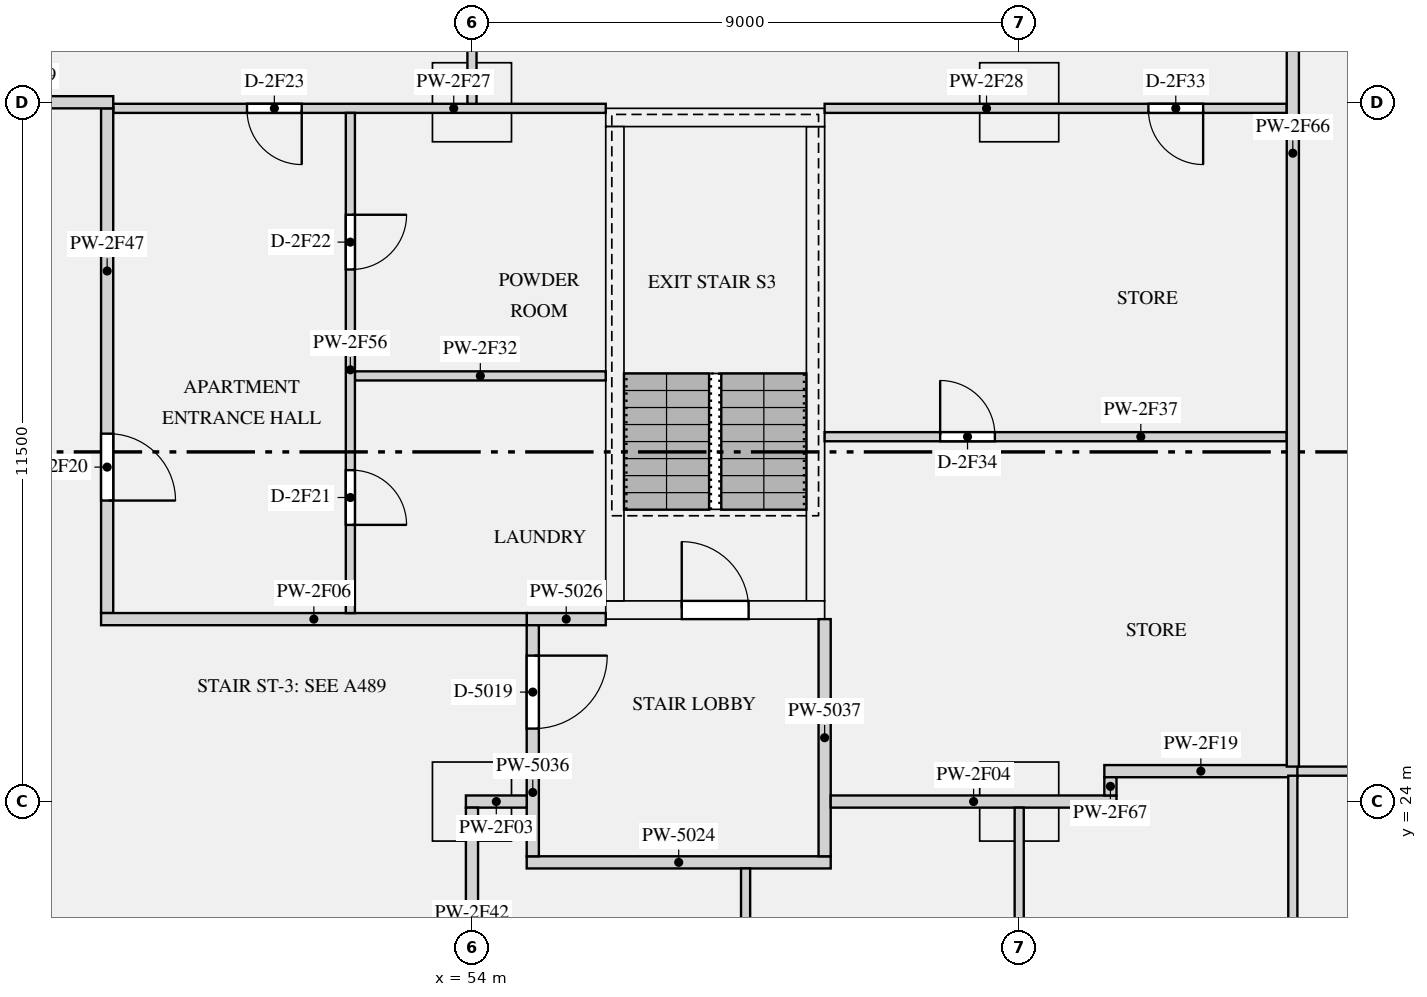
"""IFC4 building model, lengths in metres.
Left out: names, types, materials, properties, quantities, classifications, styles, units other than length and angle.
Written with IfcOpenShell. Run it as: python <this file> out.ifc"""

import sys

from ifc_helpers import new_model, si_unit, direction, frame, frame_2d, origin, origin_2d, place, context, subcontext, project, spatial, rectangle, extrude, element, fill, save


model = new_model("IFC4")
c1 = context("Model", 3, precision=1e-05, world=origin(), true_north=direction((0.0, 1.0)))
c2 = subcontext(c1, "Body", "Model", "MODEL_VIEW")
j1 = project(units=[si_unit("LENGTHUNIT", "METRE"), si_unit("PLANEANGLEUNIT", "RADIAN")], contexts=[c1])
p1 = place(None, origin())
s1 = spatial("IfcSite", under=j1, at=p1, CompositionType="ELEMENT")
p2 = place(p1, origin())
s2 = spatial("IfcBuilding", under=s1, at=p2, CompositionType="ELEMENT")
p3 = place(p2, frame((0.0, 0.0, 127.65)))
s3 = spatial("IfcBuildingStorey", under=s2, at=p3, CompositionType="ELEMENT", Elevation=127.65)
for number, where, z_axis, x_axis in (
    (1, (54.0, 24.0, 0.0), (0.0, 0.0, 1.0), (1.0, 0.0, 0.0)),
    (2, (63.0, 24.0, 0.0), (0.0, 0.0, 1.0), (1.0, 0.0, 0.0)),
    (3, (54.0, 35.5, 0.0), (0.0, 0.0, 1.0), (1.0, 0.0, 0.0)),
    (4, (63.0, 35.5, 0.0), (0.0, 0.0, 1.0), (1.0, 0.0, 0.0)),
):
    element("IfcColumn", number, at=place(p3, frame(where, z_axis=z_axis, x_axis=x_axis)), inside=s3, PredefinedType="COLUMN", context=c2, shape_type="SweptSolid", body=[
        extrude(rectangle(XDim=1.3, YDim=1.3, at=origin_2d()), origin(), (0.0, 0.0, 1.0), 3.15),
    ])
p4 = place(p3, frame((56.2, 27.15, 0.0), z_axis=(0.0, 0.0, 1.0), x_axis=(1.0, 0.0, 0.0)))
e5 = element("IfcWall", 5, at=p4, inside=s3, PredefinedType="SHEAR", context=c2, shape_type="SweptSolid", body=[
    extrude(rectangle(XDim=3.6, YDim=0.3, at=frame_2d((1.8, 0.0))), origin(), (0.0, 0.0, 1.0), 3.15),
])
p5 = place(p4, frame((1.25, 0.0, 0.0)))
e6 = element("IfcOpeningElement", 6, at=p5, cuts=e5, PredefinedType="OPENING", context=c2, shape_type="SweptSolid", body=[
    extrude(rectangle(XDim=1.1, YDim=2.1, at=frame_2d((0.55, 1.05))), frame((0.0, 0.16, 0.0), z_axis=(0.0, -1.0, 0.0), x_axis=(1.0, 0.0, 0.0)), (0.0, 0.0, 1.0), 0.32),
])
p6 = place(p3, frame((56.2, 35.25, 0.0), z_axis=(0.0, 0.0, 1.0), x_axis=(1.0, 0.0, 0.0)))
e7 = element("IfcWall", 7, at=p6, inside=s3, PredefinedType="SHEAR", context=c2, shape_type="SweptSolid", body=[
    extrude(rectangle(XDim=3.6, YDim=0.3, at=frame_2d((1.8, 0.0))), origin(), (0.0, 0.0, 1.0), 3.15),
])
for number, where, z_axis, x_axis in (
    (8, (56.35, 27.3, 0.0), (0.0, 0.0, 1.0), (0.0, 1.0, 0.0)),
    (9, (59.65, 27.3, 0.0), (0.0, 0.0, 1.0), (0.0, 1.0, 0.0)),
):
    element("IfcWall", number, at=place(p3, frame(where, z_axis=z_axis, x_axis=x_axis)), inside=s3, PredefinedType="SHEAR", context=c2, shape_type="SweptSolid", body=[
        extrude(rectangle(XDim=7.8, YDim=0.3, at=frame_2d((3.9, 0.0))), origin(), (0.0, 0.0, 1.0), 3.15),
    ])
p7 = place(p3, frame((54.9, 23.0, 0.0), z_axis=(0.0, 0.0, 1.0), x_axis=(1.0, 0.0, 0.0)))
e10 = element("IfcWall", 10, at=p7, inside=s3, PredefinedType="PARTITIONING", context=c2, shape_type="SweptSolid", body=[
    extrude(rectangle(XDim=5.0, YDim=0.2, at=frame_2d((2.5, 0.0))), origin(), (0.0, 0.0, 1.0), 2.65),
])
p8 = place(p3, frame((54.9, 27.0, 0.0), z_axis=(0.0, 0.0, 1.0), x_axis=(1.0, 0.0, 0.0)))
e11 = element("IfcWall", 11, at=p8, inside=s3, PredefinedType="PARTITIONING", context=c2, shape_type="SweptSolid", body=[
    extrude(rectangle(XDim=1.3, YDim=0.2, at=frame_2d((0.65, 0.0))), origin(), (0.0, 0.0, 1.0), 2.65),
])
p9 = place(p3, frame((55.0, 23.1, 0.0), z_axis=(0.0, 0.0, 1.0), x_axis=(0.0, 1.0, 0.0)))
e12 = element("IfcWall", 12, at=p9, inside=s3, PredefinedType="PARTITIONING", context=c2, shape_type="SweptSolid", body=[
    extrude(rectangle(XDim=3.8, YDim=0.2, at=frame_2d((1.9, 0.0))), origin(), (0.0, 0.0, 1.0), 2.65),
])
p10 = place(p9, frame((2.1, 0.0, 0.0)))
e13 = element("IfcOpeningElement", 13, at=p10, cuts=e12, PredefinedType="OPENING", context=c2, shape_type="SweptSolid", body=[
    extrude(rectangle(XDim=1.2, YDim=2.1, at=frame_2d((0.6, 1.05))), frame((0.0, 0.11, 0.0), z_axis=(0.0, -1.0, 0.0), x_axis=(1.0, 0.0, 0.0)), (0.0, 0.0, 1.0), 0.22),
])
p11 = place(p3, frame((59.8, 23.1, 0.0), z_axis=(0.0, 0.0, 1.0), x_axis=(0.0, 1.0, 0.0)))
e14 = element("IfcWall", 14, at=p11, inside=s3, PredefinedType="PARTITIONING", context=c2, shape_type="SweptSolid", body=[
    extrude(rectangle(XDim=3.9, YDim=0.2, at=frame_2d((1.95, 0.0))), origin(), (0.0, 0.0, 1.0), 2.65),
])
p12 = place(p3, frame((53.9, 24.0, 0.0), z_axis=(0.0, 0.0, 1.0), x_axis=(1.0, 0.0, 0.0)))
e15 = element("IfcWall", 15, at=p12, inside=s3, PredefinedType="PARTITIONING", context=c2, shape_type="SweptSolid", body=[
    extrude(rectangle(XDim=1.0, YDim=0.2, at=frame_2d((0.5, 0.0))), origin(), (0.0, 0.0, 1.0), 2.65),
])
p13 = place(p3, frame((59.9, 24.0, 0.0), z_axis=(0.0, 0.0, 1.0), x_axis=(1.0, 0.0, 0.0)))
e16 = element("IfcWall", 16, at=p13, inside=s3, PredefinedType="PARTITIONING", context=c2, shape_type="SweptSolid", body=[
    extrude(rectangle(XDim=4.7, YDim=0.2, at=frame_2d((2.35, 0.0))), origin(), (0.0, 0.0, 1.0), 2.65),
])
p14 = place(p3, frame((47.9, 27.0, 0.0), z_axis=(0.0, 0.0, 1.0), x_axis=(1.0, 0.0, 0.0)))
e17 = element("IfcWall", 17, at=p14, inside=s3, PredefinedType="PARTITIONING", context=c2, shape_type="SweptSolid", body=[
    extrude(rectangle(XDim=7.0, YDim=0.2, at=frame_2d((3.5, 0.0))), origin(), (0.0, 0.0, 1.0), 2.65),
])
p15 = place(p3, frame((45.0, 35.5, 0.0), z_axis=(0.0, 0.0, 1.0), x_axis=(1.0, 0.0, 0.0)))
e18 = element("IfcWall", 18, at=p15, inside=s3, PredefinedType="PARTITIONING", context=c2, shape_type="SweptSolid", body=[
    extrude(rectangle(XDim=3.1, YDim=0.2, at=frame_2d((1.55, 0.0))), origin(), (0.0, 0.0, 1.0), 2.65),
])
p16 = place(p3, frame((67.425, 24.5, 0.0), z_axis=(0.0, 0.0, 1.0), x_axis=(1.0, 0.0, 0.0)))
e19 = element("IfcWall", 19, at=p16, inside=s3, PredefinedType="PARTITIONING", context=c2, shape_type="SweptSolid", body=[
    extrude(rectangle(XDim=4.65, YDim=0.15, at=frame_2d((2.325, 0.0))), origin(), (0.0, 0.0, 1.0), 2.65),
])
p17 = place(p16, frame((1.25, 0.0, 0.0)))
e20 = element("IfcOpeningElement", 20, at=p17, cuts=e19, PredefinedType="OPENING", context=c2, shape_type="SweptSolid", body=[
    extrude(rectangle(XDim=1.5, YDim=2.1, at=frame_2d((0.75, 1.05))), frame((0.0, 0.085, 0.0), z_axis=(0.0, -1.0, 0.0), x_axis=(1.0, 0.0, 0.0)), (0.0, 0.0, 1.0), 0.17),
])
p18 = place(p3, frame((64.4, 24.5, 0.0), z_axis=(0.0, 0.0, 1.0), x_axis=(1.0, 0.0, 0.0)))
e21 = element("IfcWall", 21, at=p18, inside=s3, PredefinedType="PARTITIONING", context=c2, shape_type="SweptSolid", body=[
    extrude(rectangle(XDim=3.175, YDim=0.2, at=frame_2d((1.587, 0.0))), origin(), (0.0, 0.0, 1.0), 2.65),
])
p19 = place(p3, frame((48.1, 35.4, 0.0), z_axis=(0.0, 0.0, 1.0), x_axis=(1.0, 0.0, 0.0)))
e22 = element("IfcWall", 22, at=p19, inside=s3, PredefinedType="PARTITIONING", context=c2, shape_type="SweptSolid", body=[
    extrude(rectangle(XDim=8.1, YDim=0.15, at=frame_2d((4.05, 0.0))), origin(), (0.0, 0.0, 1.0), 2.65),
])
p20 = place(p19, frame((2.2, 0.0, 0.0)))
e23 = element("IfcOpeningElement", 23, at=p20, cuts=e22, PredefinedType="OPENING", context=c2, shape_type="SweptSolid", body=[
    extrude(rectangle(XDim=0.9, YDim=2.1, at=frame_2d((0.45, 1.05))), frame((0.0, 0.085, 0.0), z_axis=(0.0, -1.0, 0.0), x_axis=(1.0, 0.0, 0.0)), (0.0, 0.0, 1.0), 0.17),
])
p21 = place(p3, frame((59.8, 35.4, 0.0), z_axis=(0.0, 0.0, 1.0), x_axis=(1.0, 0.0, 0.0)))
e24 = element("IfcWall", 24, at=p21, inside=s3, PredefinedType="PARTITIONING", context=c2, shape_type="SweptSolid", body=[
    extrude(rectangle(XDim=7.6, YDim=0.15, at=frame_2d((3.8, 0.0))), origin(), (0.0, 0.0, 1.0), 2.65),
])
p22 = place(p21, frame((5.325, 0.0, 0.0)))
e25 = element("IfcOpeningElement", 25, at=p22, cuts=e24, PredefinedType="OPENING", context=c2, shape_type="SweptSolid", body=[
    extrude(rectangle(XDim=0.9, YDim=2.1, at=frame_2d((0.45, 1.05))), frame((0.0, 0.085, 0.0), z_axis=(0.0, -1.0, 0.0), x_axis=(1.0, 0.0, 0.0)), (0.0, 0.0, 1.0), 0.17),
])
p23 = place(p3, frame((52.075, 31.0, 0.0), z_axis=(0.0, 0.0, 1.0), x_axis=(1.0, 0.0, 0.0)))
e26 = element("IfcWall", 26, at=p23, inside=s3, PredefinedType="PARTITIONING", context=c2, shape_type="SweptSolid", body=[
    extrude(rectangle(XDim=4.125, YDim=0.15, at=frame_2d((2.062, 0.0))), origin(), (0.0, 0.0, 1.0), 2.65),
])
p24 = place(p3, frame((59.8, 30.0, 0.0), z_axis=(0.0, 0.0, 1.0), x_axis=(1.0, 0.0, 0.0)))
e27 = element("IfcWall", 27, at=p24, inside=s3, PredefinedType="PARTITIONING", context=c2, shape_type="SweptSolid", body=[
    extrude(rectangle(XDim=7.6, YDim=0.15, at=frame_2d((3.8, 0.0))), origin(), (0.0, 0.0, 1.0), 2.65),
])
p25 = place(p24, frame((1.9, 0.0, 0.0)))
e28 = element("IfcOpeningElement", 28, at=p25, cuts=e27, PredefinedType="OPENING", context=c2, shape_type="SweptSolid", body=[
    extrude(rectangle(XDim=0.9, YDim=2.1, at=frame_2d((0.45, 1.05))), frame((0.0, 0.085, 0.0), z_axis=(0.0, -1.0, 0.0), x_axis=(1.0, 0.0, 0.0)), (0.0, 0.0, 1.0), 0.17),
])
p26 = place(p3, frame((54.0, 35.475, 0.0), z_axis=(0.0, 0.0, 1.0), x_axis=(0.0, 1.0, 0.0)))
e29 = element("IfcWall", 29, at=p26, inside=s3, PredefinedType="PARTITIONING", context=c2, shape_type="SweptSolid", body=[
    extrude(rectangle(XDim=9.275, YDim=0.15, at=frame_2d((4.637, 0.0))), origin(), (0.0, 0.0, 1.0), 2.65),
])
p27 = place(p26, frame((1.65, 0.0, 0.0)))
e30 = element("IfcOpeningElement", 30, at=p27, cuts=e29, PredefinedType="OPENING", context=c2, shape_type="SweptSolid", body=[
    extrude(rectangle(XDim=0.9, YDim=2.1, at=frame_2d((0.45, 1.05))), frame((0.0, 0.085, 0.0), z_axis=(0.0, -1.0, 0.0), x_axis=(1.0, 0.0, 0.0)), (0.0, 0.0, 1.0), 0.17),
])
p28 = place(p3, frame((54.0, 16.1, 0.0), z_axis=(0.0, 0.0, 1.0), x_axis=(0.0, 1.0, 0.0)))
e31 = element("IfcWall", 31, at=p28, inside=s3, PredefinedType="PARTITIONING", context=c2, shape_type="SweptSolid", body=[
    extrude(rectangle(XDim=7.8, YDim=0.2, at=frame_2d((3.9, 0.0))), origin(), (0.0, 0.0, 1.0), 2.65),
])
p29 = place(p28, frame((2.35, 0.0, 0.0)))
e32 = element("IfcOpeningElement", 32, at=p29, cuts=e31, PredefinedType="OPENING", context=c2, shape_type="SweptSolid", body=[
    extrude(rectangle(XDim=1.1, YDim=2.1, at=frame_2d((0.55, 1.05))), frame((0.0, 0.11, 0.0), z_axis=(0.0, -1.0, 0.0), x_axis=(1.0, 0.0, 0.0)), (0.0, 0.0, 1.0), 0.22),
])
p30 = place(p3, frame((48.0, 27.1, 0.0), z_axis=(0.0, 0.0, 1.0), x_axis=(0.0, 1.0, 0.0)))
e33 = element("IfcWall", 33, at=p30, inside=s3, PredefinedType="PARTITIONING", context=c2, shape_type="SweptSolid", body=[
    extrude(rectangle(XDim=8.3, YDim=0.2, at=frame_2d((4.15, 0.0))), origin(), (0.0, 0.0, 1.0), 2.65),
])
p31 = place(p30, frame((1.85, 0.0, 0.0)))
e34 = element("IfcOpeningElement", 34, at=p31, cuts=e33, PredefinedType="OPENING", context=c2, shape_type="SweptSolid", body=[
    extrude(rectangle(XDim=1.1, YDim=2.1, at=frame_2d((0.55, 1.05))), frame((0.0, 0.11, 0.0), z_axis=(0.0, -1.0, 0.0), x_axis=(1.0, 0.0, 0.0)), (0.0, 0.0, 1.0), 0.22),
])
p32 = place(p3, frame((52.0, 27.1, 0.0), z_axis=(0.0, 0.0, 1.0), x_axis=(0.0, 1.0, 0.0)))
e35 = element("IfcWall", 35, at=p32, inside=s3, PredefinedType="PARTITIONING", context=c2, shape_type="SweptSolid", body=[
    extrude(rectangle(XDim=8.225, YDim=0.15, at=frame_2d((4.112, 0.0))), origin(), (0.0, 0.0, 1.0), 2.65),
])
p33 = place(p32, frame((1.45, 0.0, 0.0)))
e36 = element("IfcOpeningElement", 36, at=p33, cuts=e35, PredefinedType="OPENING", context=c2, shape_type="SweptSolid", body=[
    extrude(rectangle(XDim=0.9, YDim=2.1, at=frame_2d((0.45, 1.05))), frame((0.0, 0.085, 0.0), z_axis=(0.0, -1.0, 0.0), x_axis=(1.0, 0.0, 0.0)), (0.0, 0.0, 1.0), 0.17),
])
p34 = place(p32, frame((5.65, 0.0, 0.0)))
e37 = element("IfcOpeningElement", 37, at=p34, cuts=e35, PredefinedType="OPENING", context=c2, shape_type="SweptSolid", body=[
    extrude(rectangle(XDim=0.9, YDim=2.1, at=frame_2d((0.45, 1.05))), frame((0.0, 0.085, 0.0), z_axis=(0.0, -1.0, 0.0), x_axis=(1.0, 0.0, 0.0)), (0.0, 0.0, 1.0), 0.17),
])
p35 = place(p3, frame((63.0, 12.575, 0.0), z_axis=(0.0, 0.0, 1.0), x_axis=(0.0, 1.0, 0.0)))
e38 = element("IfcWall", 38, at=p35, inside=s3, PredefinedType="PARTITIONING", context=c2, shape_type="SweptSolid", body=[
    extrude(rectangle(XDim=11.325, YDim=0.15, at=frame_2d((5.663, 0.0))), origin(), (0.0, 0.0, 1.0), 2.65),
])
p36 = place(p35, frame((1.8, 0.0, 0.0)))
e39 = element("IfcOpeningElement", 39, at=p36, cuts=e38, PredefinedType="OPENING", context=c2, shape_type="SweptSolid", body=[
    extrude(rectangle(XDim=0.9, YDim=2.1, at=frame_2d((0.45, 1.05))), frame((0.0, 0.085, 0.0), z_axis=(0.0, -1.0, 0.0), x_axis=(1.0, 0.0, 0.0)), (0.0, 0.0, 1.0), 0.17),
])
p37 = place(p35, frame((6.9, 0.0, 0.0)))
e40 = element("IfcOpeningElement", 40, at=p37, cuts=e38, PredefinedType="OPENING", context=c2, shape_type="SweptSolid", body=[
    extrude(rectangle(XDim=0.9, YDim=2.1, at=frame_2d((0.45, 1.05))), frame((0.0, 0.085, 0.0), z_axis=(0.0, -1.0, 0.0), x_axis=(1.0, 0.0, 0.0)), (0.0, 0.0, 1.0), 0.17),
])
p38 = place(p3, frame((67.5, 16.575, 0.0), z_axis=(0.0, 0.0, 1.0), x_axis=(0.0, 1.0, 0.0)))
e41 = element("IfcWall", 41, at=p38, inside=s3, PredefinedType="PARTITIONING", context=c2, shape_type="SweptSolid", body=[
    extrude(rectangle(XDim=7.85, YDim=0.15, at=frame_2d((3.925, 0.0))), origin(), (0.0, 0.0, 1.0), 2.65),
])
p39 = place(p3, frame((67.5, 24.575, 0.0), z_axis=(0.0, 0.0, 1.0), x_axis=(0.0, 1.0, 0.0)))
e42 = element("IfcWall", 42, at=p39, inside=s3, PredefinedType="PARTITIONING", context=c2, shape_type="SweptSolid", body=[
    extrude(rectangle(XDim=20.175, YDim=0.2, at=frame_2d((10.087, 0.0))), origin(), (0.0, 0.0, 1.0), 2.65),
])
p40 = place(p3, frame((64.5, 24.1, 0.0), z_axis=(0.0, 0.0, 1.0), x_axis=(0.0, 1.0, 0.0)))
e43 = element("IfcWall", 43, at=p40, inside=s3, PredefinedType="PARTITIONING", context=c2, shape_type="SweptSolid", body=[
    extrude(rectangle(XDim=0.3, YDim=0.2, at=frame_2d((0.15, 0.0))), origin(), (0.0, 0.0, 1.0), 2.65),
])
p41 = place(p3, frame((58.5, 12.575, 0.0), z_axis=(0.0, 0.0, 1.0), x_axis=(0.0, 1.0, 0.0)))
e44 = element("IfcWall", 44, at=p41, inside=s3, PredefinedType="PARTITIONING", context=c2, shape_type="SweptSolid", body=[
    extrude(rectangle(XDim=10.325, YDim=0.15, at=frame_2d((5.163, 0.0))), origin(), (0.0, 0.0, 1.0), 2.65),
])
p42 = place(p41, frame((4.75, 0.0, 0.0)))
e45 = element("IfcOpeningElement", 45, at=p42, cuts=e44, PredefinedType="OPENING", context=c2, shape_type="SweptSolid", body=[
    extrude(rectangle(XDim=0.9, YDim=2.1, at=frame_2d((0.45, 1.05))), frame((0.0, 0.085, 0.0), z_axis=(0.0, -1.0, 0.0), x_axis=(1.0, 0.0, 0.0)), (0.0, 0.0, 1.0), 0.17),
])
p43 = place(p5, origin())
e46 = element("IfcDoor", 46, at=p43, inside=s3, OperationType="SINGLE_SWING_LEFT", PredefinedType="DOOR", context=c2, shape_type="SweptSolid", body=[
    extrude(rectangle(XDim=1.1, YDim=2.1, at=frame_2d((0.55, 1.05))), frame((0.0, 0.025, 0.0), z_axis=(0.0, -1.0, 0.0), x_axis=(1.0, 0.0, 0.0)), (0.0, 0.0, 1.0), 0.05),
])
fill(e6, e46)
p44 = place(p10, frame((1.2, 0.0, 0.0), z_axis=(0.0, 0.0, 1.0), x_axis=(-1.0, 0.0, 0.0)))
e47 = element("IfcDoor", 47, at=p44, inside=s3, OperationType="SINGLE_SWING_LEFT", PredefinedType="DOOR", context=c2, shape_type="SweptSolid", body=[
    extrude(rectangle(XDim=1.2, YDim=2.1, at=frame_2d((0.6, 1.05))), frame((0.0, 0.025, 0.0), z_axis=(0.0, -1.0, 0.0), x_axis=(1.0, 0.0, 0.0)), (0.0, 0.0, 1.0), 0.05),
])
fill(e13, e47)
p45 = place(p31, frame((1.1, 0.0, 0.0), z_axis=(0.0, 0.0, 1.0), x_axis=(-1.0, 0.0, 0.0)))
e48 = element("IfcDoor", 48, at=p45, inside=s3, OperationType="SINGLE_SWING_RIGHT", PredefinedType="DOOR", context=c2, shape_type="SweptSolid", body=[
    extrude(rectangle(XDim=1.1, YDim=2.1, at=frame_2d((0.55, 1.05))), frame((0.0, 0.025, 0.0), z_axis=(0.0, -1.0, 0.0), x_axis=(1.0, 0.0, 0.0)), (0.0, 0.0, 1.0), 0.05),
])
fill(e34, e48)
p46 = place(p33, frame((0.9, 0.0, 0.0), z_axis=(0.0, 0.0, 1.0), x_axis=(-1.0, 0.0, 0.0)))
e49 = element("IfcDoor", 49, at=p46, inside=s3, OperationType="SINGLE_SWING_RIGHT", PredefinedType="DOOR", context=c2, shape_type="SweptSolid", body=[
    extrude(rectangle(XDim=0.9, YDim=2.1, at=frame_2d((0.45, 1.05))), frame((0.0, 0.025, 0.0), z_axis=(0.0, -1.0, 0.0), x_axis=(1.0, 0.0, 0.0)), (0.0, 0.0, 1.0), 0.05),
])
fill(e36, e49)
p47 = place(p34, frame((0.9, 0.0, 0.0), z_axis=(0.0, 0.0, 1.0), x_axis=(-1.0, 0.0, 0.0)))
e50 = element("IfcDoor", 50, at=p47, inside=s3, OperationType="SINGLE_SWING_LEFT", PredefinedType="DOOR", context=c2, shape_type="SweptSolid", body=[
    extrude(rectangle(XDim=0.9, YDim=2.1, at=frame_2d((0.45, 1.05))), frame((0.0, 0.025, 0.0), z_axis=(0.0, -1.0, 0.0), x_axis=(1.0, 0.0, 0.0)), (0.0, 0.0, 1.0), 0.05),
])
fill(e37, e50)
p48 = place(p20, frame((0.9, 0.0, 0.0), z_axis=(0.0, 0.0, 1.0), x_axis=(-1.0, 0.0, 0.0)))
e51 = element("IfcDoor", 51, at=p48, inside=s3, OperationType="SINGLE_SWING_LEFT", PredefinedType="DOOR", context=c2, shape_type="SweptSolid", body=[
    extrude(rectangle(XDim=0.9, YDim=2.1, at=frame_2d((0.45, 1.05))), frame((0.0, 0.025, 0.0), z_axis=(0.0, -1.0, 0.0), x_axis=(1.0, 0.0, 0.0)), (0.0, 0.0, 1.0), 0.05),
])
fill(e23, e51)
p49 = place(p22, frame((0.9, 0.0, 0.0), z_axis=(0.0, 0.0, 1.0), x_axis=(-1.0, 0.0, 0.0)))
e52 = element("IfcDoor", 52, at=p49, inside=s3, OperationType="SINGLE_SWING_LEFT", PredefinedType="DOOR", context=c2, shape_type="SweptSolid", body=[
    extrude(rectangle(XDim=0.9, YDim=2.1, at=frame_2d((0.45, 1.05))), frame((0.0, 0.025, 0.0), z_axis=(0.0, -1.0, 0.0), x_axis=(1.0, 0.0, 0.0)), (0.0, 0.0, 1.0), 0.05),
])
fill(e25, e52)
p50 = place(p25, origin())
e53 = element("IfcDoor", 53, at=p50, inside=s3, OperationType="SINGLE_SWING_LEFT", PredefinedType="DOOR", context=c2, shape_type="SweptSolid", body=[
    extrude(rectangle(XDim=0.9, YDim=2.1, at=frame_2d((0.45, 1.05))), frame((0.0, 0.025, 0.0), z_axis=(0.0, -1.0, 0.0), x_axis=(1.0, 0.0, 0.0)), (0.0, 0.0, 1.0), 0.05),
])
fill(e28, e53)
save(model, sys.argv[1])
